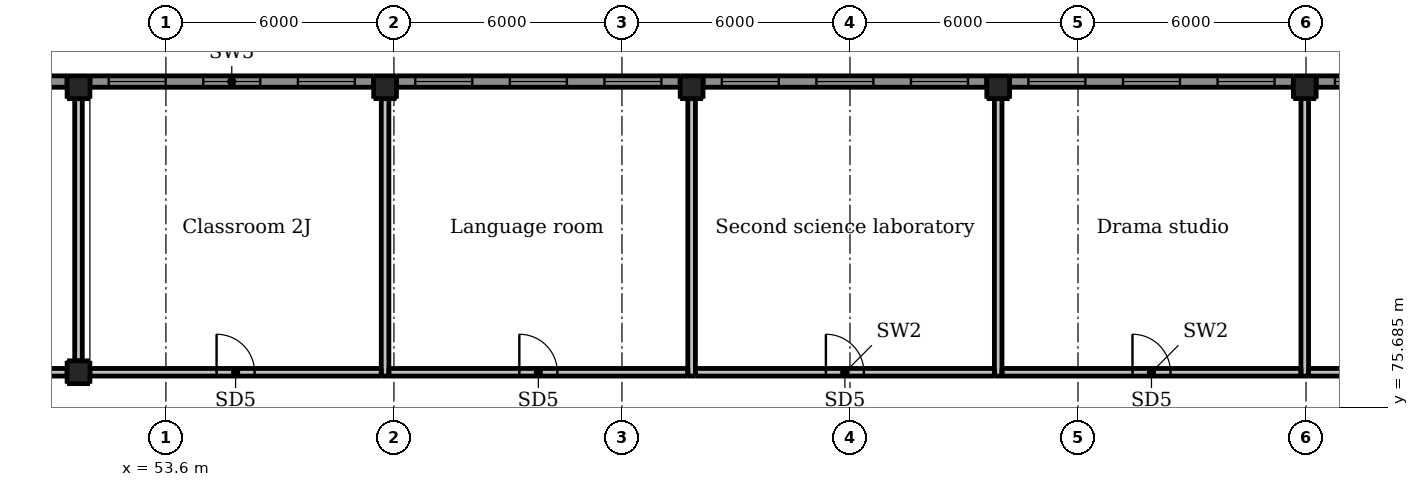
"""IFC4 building model, lengths in metres.
Left out: names, types, materials, properties, quantities, classifications, styles, units other than length and angle.
Written with IfcOpenShell. Run it as: python <this file> out.ifc"""

import sys

from ifc_helpers import new_model, si_unit, direction, frame, frame_2d, origin, origin_2d, place, context, subcontext, project, spatial, rectangle, extrude, element, fill, save


model = new_model("IFC4")
c1 = context("Model", 3, precision=1e-05, world=origin(), true_north=direction((0.0, 1.0)))
c2 = subcontext(c1, "Body", "Model", "MODEL_VIEW")
j1 = project(units=[si_unit("LENGTHUNIT", "METRE"), si_unit("PLANEANGLEUNIT", "RADIAN")], contexts=[c1])
p1 = place(None, origin())
s1 = spatial("IfcSite", under=j1, at=p1, CompositionType="ELEMENT")
p2 = place(p1, origin())
s2 = spatial("IfcBuilding", under=s1, at=p2, CompositionType="ELEMENT")
p3 = place(p2, frame((0.0, 0.0, 10.0)))
s3 = spatial("IfcBuildingStorey", under=s2, at=p3, CompositionType="ELEMENT", Elevation=10.0)
for number, where, z_axis, x_axis in (
    (1, (51.3, 76.6, -0.3), (0.0, 0.0, 1.0), (1.0, 0.0, 0.0)),
    (2, (51.3, 84.1, -0.3), (0.0, 0.0, 1.0), (1.0, 0.0, 0.0)),
    (3, (59.367, 84.1, -0.3), (0.0, 0.0, 1.0), (1.0, 0.0, 0.0)),
    (4, (67.433, 84.1, -0.3), (0.0, 0.0, 1.0), (1.0, 0.0, 0.0)),
    (5, (75.5, 84.1, -0.3), (0.0, 0.0, 1.0), (1.0, 0.0, 0.0)),
    (6, (83.567, 84.1, -0.3), (0.0, 0.0, 1.0), (1.0, 0.0, 0.0)),
):
    element("IfcColumn", number, at=place(p3, frame(where, z_axis=z_axis, x_axis=x_axis)), inside=s3, PredefinedType="COLUMN", context=c2, shape_type="SweptSolid", body=[
        extrude(rectangle(XDim=0.6, YDim=0.6, at=origin_2d()), origin(), (0.0, 0.0, 1.0), 4.5),
    ])
p4 = place(p3, frame((43.9, 84.25, 0.0), z_axis=(0.0, 0.0, 1.0), x_axis=(1.0, 0.0, 0.0)))
e7 = element("IfcWall", 7, at=p4, inside=s3, PredefinedType="SOLIDWALL", context=c2, shape_type="SweptSolid", body=[
    extrude(rectangle(XDim=7.1, YDim=0.3, at=frame_2d((3.55, 0.0))), origin(), (0.0, 0.0, 1.0), 3.3),
])
p5 = place(p4, frame((0.433, 0.0, 0.9)))
e8 = element("IfcOpeningElement", 8, at=p5, cuts=e7, PredefinedType="OPENING", context=c2, shape_type="SweptSolid", body=[
    extrude(rectangle(XDim=1.5, YDim=1.5, at=frame_2d((0.75, 0.75))), frame((0.0, 0.16, 0.0), z_axis=(0.0, -1.0, 0.0), x_axis=(1.0, 0.0, 0.0)), (0.0, 0.0, 1.0), 0.32),
])
p6 = place(p4, frame((2.8, 0.0, 0.9)))
e9 = element("IfcOpeningElement", 9, at=p6, cuts=e7, PredefinedType="OPENING", context=c2, shape_type="SweptSolid", body=[
    extrude(rectangle(XDim=1.5, YDim=1.5, at=frame_2d((0.75, 0.75))), frame((0.0, 0.16, 0.0), z_axis=(0.0, -1.0, 0.0), x_axis=(1.0, 0.0, 0.0)), (0.0, 0.0, 1.0), 0.32),
])
p7 = place(p4, frame((5.167, 0.0, 0.9)))
e10 = element("IfcOpeningElement", 10, at=p7, cuts=e7, PredefinedType="OPENING", context=c2, shape_type="SweptSolid", body=[
    extrude(rectangle(XDim=1.5, YDim=1.5, at=frame_2d((0.75, 0.75))), frame((0.0, 0.16, 0.0), z_axis=(0.0, -1.0, 0.0), x_axis=(1.0, 0.0, 0.0)), (0.0, 0.0, 1.0), 0.32),
])
p8 = place(p3, frame((51.6, 84.25, 0.0), z_axis=(0.0, 0.0, 1.0), x_axis=(1.0, 0.0, 0.0)))
e11 = element("IfcWall", 11, at=p8, inside=s3, PredefinedType="SOLIDWALL", context=c2, shape_type="SweptSolid", body=[
    extrude(rectangle(XDim=7.467, YDim=0.3, at=frame_2d((3.733, 0.0))), origin(), (0.0, 0.0, 1.0), 3.3),
])
p9 = place(p8, frame((0.494, 0.0, 0.9)))
e12 = element("IfcOpeningElement", 12, at=p9, cuts=e11, PredefinedType="OPENING", context=c2, shape_type="SweptSolid", body=[
    extrude(rectangle(XDim=1.5, YDim=1.5, at=frame_2d((0.75, 0.75))), frame((0.0, 0.16, 0.0), z_axis=(0.0, -1.0, 0.0), x_axis=(1.0, 0.0, 0.0)), (0.0, 0.0, 1.0), 0.32),
])
p10 = place(p8, frame((2.983, 0.0, 0.9)))
e13 = element("IfcOpeningElement", 13, at=p10, cuts=e11, PredefinedType="OPENING", context=c2, shape_type="SweptSolid", body=[
    extrude(rectangle(XDim=1.5, YDim=1.5, at=frame_2d((0.75, 0.75))), frame((0.0, 0.16, 0.0), z_axis=(0.0, -1.0, 0.0), x_axis=(1.0, 0.0, 0.0)), (0.0, 0.0, 1.0), 0.32),
])
p11 = place(p8, frame((5.472, 0.0, 0.9)))
e14 = element("IfcOpeningElement", 14, at=p11, cuts=e11, PredefinedType="OPENING", context=c2, shape_type="SweptSolid", body=[
    extrude(rectangle(XDim=1.5, YDim=1.5, at=frame_2d((0.75, 0.75))), frame((0.0, 0.16, 0.0), z_axis=(0.0, -1.0, 0.0), x_axis=(1.0, 0.0, 0.0)), (0.0, 0.0, 1.0), 0.32),
])
p12 = place(p3, frame((59.667, 84.25, 0.0), z_axis=(0.0, 0.0, 1.0), x_axis=(1.0, 0.0, 0.0)))
e15 = element("IfcWall", 15, at=p12, inside=s3, PredefinedType="SOLIDWALL", context=c2, shape_type="SweptSolid", body=[
    extrude(rectangle(XDim=7.466, YDim=0.3, at=frame_2d((3.733, 0.0))), origin(), (0.0, 0.0, 1.0), 3.3),
])
p13 = place(p12, frame((0.494, 0.0, 0.9)))
e16 = element("IfcOpeningElement", 16, at=p13, cuts=e15, PredefinedType="OPENING", context=c2, shape_type="SweptSolid", body=[
    extrude(rectangle(XDim=1.5, YDim=1.5, at=frame_2d((0.75, 0.75))), frame((0.0, 0.16, 0.0), z_axis=(0.0, -1.0, 0.0), x_axis=(1.0, 0.0, 0.0)), (0.0, 0.0, 1.0), 0.32),
])
p14 = place(p12, frame((2.983, 0.0, 0.9)))
e17 = element("IfcOpeningElement", 17, at=p14, cuts=e15, PredefinedType="OPENING", context=c2, shape_type="SweptSolid", body=[
    extrude(rectangle(XDim=1.5, YDim=1.5, at=frame_2d((0.75, 0.75))), frame((0.0, 0.16, 0.0), z_axis=(0.0, -1.0, 0.0), x_axis=(1.0, 0.0, 0.0)), (0.0, 0.0, 1.0), 0.32),
])
p15 = place(p12, frame((5.472, 0.0, 0.9)))
e18 = element("IfcOpeningElement", 18, at=p15, cuts=e15, PredefinedType="OPENING", context=c2, shape_type="SweptSolid", body=[
    extrude(rectangle(XDim=1.5, YDim=1.5, at=frame_2d((0.75, 0.75))), frame((0.0, 0.16, 0.0), z_axis=(0.0, -1.0, 0.0), x_axis=(1.0, 0.0, 0.0)), (0.0, 0.0, 1.0), 0.32),
])
p16 = place(p3, frame((67.733, 84.25, 0.0), z_axis=(0.0, 0.0, 1.0), x_axis=(1.0, 0.0, 0.0)))
e19 = element("IfcWall", 19, at=p16, inside=s3, PredefinedType="SOLIDWALL", context=c2, shape_type="SweptSolid", body=[
    extrude(rectangle(XDim=7.467, YDim=0.3, at=frame_2d((3.733, 0.0))), origin(), (0.0, 0.0, 1.0), 3.3),
])
p17 = place(p16, frame((0.494, 0.0, 0.9)))
e20 = element("IfcOpeningElement", 20, at=p17, cuts=e19, PredefinedType="OPENING", context=c2, shape_type="SweptSolid", body=[
    extrude(rectangle(XDim=1.5, YDim=1.5, at=frame_2d((0.75, 0.75))), frame((0.0, 0.16, 0.0), z_axis=(0.0, -1.0, 0.0), x_axis=(1.0, 0.0, 0.0)), (0.0, 0.0, 1.0), 0.32),
])
p18 = place(p16, frame((2.983, 0.0, 0.9)))
e21 = element("IfcOpeningElement", 21, at=p18, cuts=e19, PredefinedType="OPENING", context=c2, shape_type="SweptSolid", body=[
    extrude(rectangle(XDim=1.5, YDim=1.5, at=frame_2d((0.75, 0.75))), frame((0.0, 0.16, 0.0), z_axis=(0.0, -1.0, 0.0), x_axis=(1.0, 0.0, 0.0)), (0.0, 0.0, 1.0), 0.32),
])
p19 = place(p16, frame((5.472, 0.0, 0.9)))
e22 = element("IfcOpeningElement", 22, at=p19, cuts=e19, PredefinedType="OPENING", context=c2, shape_type="SweptSolid", body=[
    extrude(rectangle(XDim=1.5, YDim=1.5, at=frame_2d((0.75, 0.75))), frame((0.0, 0.16, 0.0), z_axis=(0.0, -1.0, 0.0), x_axis=(1.0, 0.0, 0.0)), (0.0, 0.0, 1.0), 0.32),
])
p20 = place(p3, frame((75.8, 84.25, 0.0), z_axis=(0.0, 0.0, 1.0), x_axis=(1.0, 0.0, 0.0)))
e23 = element("IfcWall", 23, at=p20, inside=s3, PredefinedType="SOLIDWALL", context=c2, shape_type="SweptSolid", body=[
    extrude(rectangle(XDim=7.467, YDim=0.3, at=frame_2d((3.733, 0.0))), origin(), (0.0, 0.0, 1.0), 3.3),
])
p21 = place(p20, frame((0.494, 0.0, 0.9)))
e24 = element("IfcOpeningElement", 24, at=p21, cuts=e23, PredefinedType="OPENING", context=c2, shape_type="SweptSolid", body=[
    extrude(rectangle(XDim=1.5, YDim=1.5, at=frame_2d((0.75, 0.75))), frame((0.0, 0.16, 0.0), z_axis=(0.0, -1.0, 0.0), x_axis=(1.0, 0.0, 0.0)), (0.0, 0.0, 1.0), 0.32),
])
p22 = place(p20, frame((2.983, 0.0, 0.9)))
e25 = element("IfcOpeningElement", 25, at=p22, cuts=e23, PredefinedType="OPENING", context=c2, shape_type="SweptSolid", body=[
    extrude(rectangle(XDim=1.5, YDim=1.5, at=frame_2d((0.75, 0.75))), frame((0.0, 0.16, 0.0), z_axis=(0.0, -1.0, 0.0), x_axis=(1.0, 0.0, 0.0)), (0.0, 0.0, 1.0), 0.32),
])
p23 = place(p20, frame((5.472, 0.0, 0.9)))
e26 = element("IfcOpeningElement", 26, at=p23, cuts=e23, PredefinedType="OPENING", context=c2, shape_type="SweptSolid", body=[
    extrude(rectangle(XDim=1.5, YDim=1.5, at=frame_2d((0.75, 0.75))), frame((0.0, 0.16, 0.0), z_axis=(0.0, -1.0, 0.0), x_axis=(1.0, 0.0, 0.0)), (0.0, 0.0, 1.0), 0.32),
])
p24 = place(p3, frame((83.867, 84.25, 0.0), z_axis=(0.0, 0.0, 1.0), x_axis=(1.0, 0.0, 0.0)))
e27 = element("IfcWall", 27, at=p24, inside=s3, PredefinedType="SOLIDWALL", context=c2, shape_type="SweptSolid", body=[
    extrude(rectangle(XDim=7.466, YDim=0.3, at=frame_2d((3.733, 0.0))), origin(), (0.0, 0.0, 1.0), 3.3),
])
p25 = place(p24, frame((0.494, 0.0, 0.9)))
e28 = element("IfcOpeningElement", 28, at=p25, cuts=e27, PredefinedType="OPENING", context=c2, shape_type="SweptSolid", body=[
    extrude(rectangle(XDim=1.5, YDim=1.5, at=frame_2d((0.75, 0.75))), frame((0.0, 0.16, 0.0), z_axis=(0.0, -1.0, 0.0), x_axis=(1.0, 0.0, 0.0)), (0.0, 0.0, 1.0), 0.32),
])
p26 = place(p24, frame((2.983, 0.0, 0.9)))
e29 = element("IfcOpeningElement", 29, at=p26, cuts=e27, PredefinedType="OPENING", context=c2, shape_type="SweptSolid", body=[
    extrude(rectangle(XDim=1.5, YDim=1.5, at=frame_2d((0.75, 0.75))), frame((0.0, 0.16, 0.0), z_axis=(0.0, -1.0, 0.0), x_axis=(1.0, 0.0, 0.0)), (0.0, 0.0, 1.0), 0.32),
])
p27 = place(p24, frame((5.472, 0.0, 0.9)))
e30 = element("IfcOpeningElement", 30, at=p27, cuts=e27, PredefinedType="OPENING", context=c2, shape_type="SweptSolid", body=[
    extrude(rectangle(XDim=1.5, YDim=1.5, at=frame_2d((0.75, 0.75))), frame((0.0, 0.16, 0.0), z_axis=(0.0, -1.0, 0.0), x_axis=(1.0, 0.0, 0.0)), (0.0, 0.0, 1.0), 0.32),
])
p28 = place(p3, frame((36.2, 76.6, 0.0), z_axis=(0.0, 0.0, 1.0), x_axis=(1.0, 0.0, 0.0)))
e31 = element("IfcWall", 31, at=p28, inside=s3, PredefinedType="PARTITIONING", context=c2, shape_type="SweptSolid", body=[
    extrude(rectangle(XDim=14.8, YDim=0.2, at=frame_2d((7.4, 0.0))), origin(), (0.0, 0.0, 1.0), 3.1),
])
p29 = place(p28, frame((11.1, 0.0, 0.0)))
e32 = element("IfcOpeningElement", 32, at=p29, cuts=e31, PredefinedType="OPENING", context=c2, shape_type="SweptSolid", body=[
    extrude(rectangle(XDim=1.0, YDim=2.1, at=frame_2d((0.5, 1.05))), frame((0.0, 0.11, 0.0), z_axis=(0.0, -1.0, 0.0), x_axis=(1.0, 0.0, 0.0)), (0.0, 0.0, 1.0), 0.22),
])
p30 = place(p3, frame((51.3, 76.9, 0.0), z_axis=(0.0, 0.0, 1.0), x_axis=(0.0, 1.0, 0.0)))
e33 = element("IfcWall", 33, at=p30, inside=s3, PredefinedType="PARTITIONING", context=c2, shape_type="SweptSolid", body=[
    extrude(rectangle(XDim=6.9, YDim=0.2, at=frame_2d((3.45, 0.0))), origin(), (0.0, 0.0, 1.0), 3.1),
])
p31 = place(p3, frame((51.6, 76.6, 0.0), z_axis=(0.0, 0.0, 1.0), x_axis=(1.0, 0.0, 0.0)))
e34 = element("IfcWall", 34, at=p31, inside=s3, PredefinedType="PARTITIONING", context=c2, shape_type="SweptSolid", body=[
    extrude(rectangle(XDim=7.667, YDim=0.2, at=frame_2d((3.833, 0.0))), origin(), (0.0, 0.0, 1.0), 3.1),
])
p32 = place(p31, frame((3.333, 0.0, 0.0)))
e35 = element("IfcOpeningElement", 35, at=p32, cuts=e34, PredefinedType="OPENING", context=c2, shape_type="SweptSolid", body=[
    extrude(rectangle(XDim=1.0, YDim=2.1, at=frame_2d((0.5, 1.05))), frame((0.0, 0.11, 0.0), z_axis=(0.0, -1.0, 0.0), x_axis=(1.0, 0.0, 0.0)), (0.0, 0.0, 1.0), 0.22),
])
p33 = place(p3, frame((59.467, 76.6, 0.0), z_axis=(0.0, 0.0, 1.0), x_axis=(1.0, 0.0, 0.0)))
e36 = element("IfcWall", 36, at=p33, inside=s3, PredefinedType="PARTITIONING", context=c2, shape_type="SweptSolid", body=[
    extrude(rectangle(XDim=7.866, YDim=0.2, at=frame_2d((3.933, 0.0))), origin(), (0.0, 0.0, 1.0), 3.1),
])
p34 = place(p33, frame((3.433, 0.0, 0.0)))
e37 = element("IfcOpeningElement", 37, at=p34, cuts=e36, PredefinedType="OPENING", context=c2, shape_type="SweptSolid", body=[
    extrude(rectangle(XDim=1.0, YDim=2.1, at=frame_2d((0.5, 1.05))), frame((0.0, 0.11, 0.0), z_axis=(0.0, -1.0, 0.0), x_axis=(1.0, 0.0, 0.0)), (0.0, 0.0, 1.0), 0.22),
])
p35 = place(p3, frame((67.533, 76.6, 0.0), z_axis=(0.0, 0.0, 1.0), x_axis=(1.0, 0.0, 0.0)))
e38 = element("IfcWall", 38, at=p35, inside=s3, PredefinedType="PARTITIONING", context=c2, shape_type="SweptSolid", body=[
    extrude(rectangle(XDim=7.867, YDim=0.2, at=frame_2d((3.934, 0.0))), origin(), (0.0, 0.0, 1.0), 3.1),
])
p36 = place(p35, frame((3.434, 0.0, 0.0)))
e39 = element("IfcOpeningElement", 39, at=p36, cuts=e38, PredefinedType="OPENING", context=c2, shape_type="SweptSolid", body=[
    extrude(rectangle(XDim=1.0, YDim=2.1, at=frame_2d((0.5, 1.05))), frame((0.0, 0.11, 0.0), z_axis=(0.0, -1.0, 0.0), x_axis=(1.0, 0.0, 0.0)), (0.0, 0.0, 1.0), 0.22),
])
p37 = place(p3, frame((75.6, 76.6, 0.0), z_axis=(0.0, 0.0, 1.0), x_axis=(1.0, 0.0, 0.0)))
e40 = element("IfcWall", 40, at=p37, inside=s3, PredefinedType="PARTITIONING", context=c2, shape_type="SweptSolid", body=[
    extrude(rectangle(XDim=7.867, YDim=0.2, at=frame_2d((3.934, 0.0))), origin(), (0.0, 0.0, 1.0), 3.1),
])
p38 = place(p37, frame((3.434, 0.0, 0.0)))
e41 = element("IfcOpeningElement", 41, at=p38, cuts=e40, PredefinedType="OPENING", context=c2, shape_type="SweptSolid", body=[
    extrude(rectangle(XDim=1.0, YDim=2.1, at=frame_2d((0.5, 1.05))), frame((0.0, 0.11, 0.0), z_axis=(0.0, -1.0, 0.0), x_axis=(1.0, 0.0, 0.0)), (0.0, 0.0, 1.0), 0.22),
])
p39 = place(p3, frame((83.667, 76.6, 0.0), z_axis=(0.0, 0.0, 1.0), x_axis=(1.0, 0.0, 0.0)))
e42 = element("IfcWall", 42, at=p39, inside=s3, PredefinedType="PARTITIONING", context=c2, shape_type="SweptSolid", body=[
    extrude(rectangle(XDim=7.866, YDim=0.2, at=frame_2d((3.933, 0.0))), origin(), (0.0, 0.0, 1.0), 3.1),
])
p40 = place(p39, frame((3.433, 0.0, 0.0)))
e43 = element("IfcOpeningElement", 43, at=p40, cuts=e42, PredefinedType="OPENING", context=c2, shape_type="SweptSolid", body=[
    extrude(rectangle(XDim=1.0, YDim=2.1, at=frame_2d((0.5, 1.05))), frame((0.0, 0.11, 0.0), z_axis=(0.0, -1.0, 0.0), x_axis=(1.0, 0.0, 0.0)), (0.0, 0.0, 1.0), 0.22),
])
for number, where, z_axis, x_axis in (
    (44, (59.367, 76.5, 0.0), (0.0, 0.0, 1.0), (0.0, 1.0, 0.0)),
    (45, (67.433, 76.5, 0.0), (0.0, 0.0, 1.0), (0.0, 1.0, 0.0)),
    (46, (75.5, 76.5, 0.0), (0.0, 0.0, 1.0), (0.0, 1.0, 0.0)),
    (47, (83.567, 76.5, 0.0), (0.0, 0.0, 1.0), (0.0, 1.0, 0.0)),
):
    element("IfcWall", number, at=place(p3, frame(where, z_axis=z_axis, x_axis=x_axis)), inside=s3, PredefinedType="PARTITIONING", context=c2, shape_type="SweptSolid", body=[
        extrude(rectangle(XDim=7.3, YDim=0.2, at=frame_2d((3.65, 0.0))), origin(), (0.0, 0.0, 1.0), 3.1),
    ])
p41 = place(p9, origin())
e48 = element("IfcWindow", 48, at=p41, inside=s3, PartitioningType="DOUBLE_PANEL_HORIZONTAL", PredefinedType="WINDOW", context=c2, shape_type="SweptSolid", body=[
    extrude(rectangle(XDim=1.5, YDim=1.5, at=frame_2d((0.75, 0.75))), frame((0.0, 0.03, 0.0), z_axis=(0.0, -1.0, 0.0), x_axis=(1.0, 0.0, 0.0)), (0.0, 0.0, 1.0), 0.06),
])
fill(e12, e48)
p42 = place(p10, origin())
e49 = element("IfcWindow", 49, at=p42, inside=s3, PartitioningType="DOUBLE_PANEL_HORIZONTAL", PredefinedType="WINDOW", context=c2, shape_type="SweptSolid", body=[
    extrude(rectangle(XDim=1.5, YDim=1.5, at=frame_2d((0.75, 0.75))), frame((0.0, 0.03, 0.0), z_axis=(0.0, -1.0, 0.0), x_axis=(1.0, 0.0, 0.0)), (0.0, 0.0, 1.0), 0.06),
])
fill(e13, e49)
p43 = place(p11, origin())
e50 = element("IfcWindow", 50, at=p43, inside=s3, PartitioningType="DOUBLE_PANEL_HORIZONTAL", PredefinedType="WINDOW", context=c2, shape_type="SweptSolid", body=[
    extrude(rectangle(XDim=1.5, YDim=1.5, at=frame_2d((0.75, 0.75))), frame((0.0, 0.03, 0.0), z_axis=(0.0, -1.0, 0.0), x_axis=(1.0, 0.0, 0.0)), (0.0, 0.0, 1.0), 0.06),
])
fill(e14, e50)
p44 = place(p13, origin())
e51 = element("IfcWindow", 51, at=p44, inside=s3, PartitioningType="DOUBLE_PANEL_HORIZONTAL", PredefinedType="WINDOW", context=c2, shape_type="SweptSolid", body=[
    extrude(rectangle(XDim=1.5, YDim=1.5, at=frame_2d((0.75, 0.75))), frame((0.0, 0.03, 0.0), z_axis=(0.0, -1.0, 0.0), x_axis=(1.0, 0.0, 0.0)), (0.0, 0.0, 1.0), 0.06),
])
fill(e16, e51)
p45 = place(p14, origin())
e52 = element("IfcWindow", 52, at=p45, inside=s3, PartitioningType="DOUBLE_PANEL_HORIZONTAL", PredefinedType="WINDOW", context=c2, shape_type="SweptSolid", body=[
    extrude(rectangle(XDim=1.5, YDim=1.5, at=frame_2d((0.75, 0.75))), frame((0.0, 0.03, 0.0), z_axis=(0.0, -1.0, 0.0), x_axis=(1.0, 0.0, 0.0)), (0.0, 0.0, 1.0), 0.06),
])
fill(e17, e52)
p46 = place(p15, origin())
e53 = element("IfcWindow", 53, at=p46, inside=s3, PartitioningType="DOUBLE_PANEL_HORIZONTAL", PredefinedType="WINDOW", context=c2, shape_type="SweptSolid", body=[
    extrude(rectangle(XDim=1.5, YDim=1.5, at=frame_2d((0.75, 0.75))), frame((0.0, 0.03, 0.0), z_axis=(0.0, -1.0, 0.0), x_axis=(1.0, 0.0, 0.0)), (0.0, 0.0, 1.0), 0.06),
])
fill(e18, e53)
p47 = place(p17, origin())
e54 = element("IfcWindow", 54, at=p47, inside=s3, PartitioningType="DOUBLE_PANEL_HORIZONTAL", PredefinedType="WINDOW", context=c2, shape_type="SweptSolid", body=[
    extrude(rectangle(XDim=1.5, YDim=1.5, at=frame_2d((0.75, 0.75))), frame((0.0, 0.03, 0.0), z_axis=(0.0, -1.0, 0.0), x_axis=(1.0, 0.0, 0.0)), (0.0, 0.0, 1.0), 0.06),
])
fill(e20, e54)
p48 = place(p18, origin())
e55 = element("IfcWindow", 55, at=p48, inside=s3, PartitioningType="DOUBLE_PANEL_HORIZONTAL", PredefinedType="WINDOW", context=c2, shape_type="SweptSolid", body=[
    extrude(rectangle(XDim=1.5, YDim=1.5, at=frame_2d((0.75, 0.75))), frame((0.0, 0.03, 0.0), z_axis=(0.0, -1.0, 0.0), x_axis=(1.0, 0.0, 0.0)), (0.0, 0.0, 1.0), 0.06),
])
fill(e21, e55)
p49 = place(p19, origin())
e56 = element("IfcWindow", 56, at=p49, inside=s3, PartitioningType="DOUBLE_PANEL_HORIZONTAL", PredefinedType="WINDOW", context=c2, shape_type="SweptSolid", body=[
    extrude(rectangle(XDim=1.5, YDim=1.5, at=frame_2d((0.75, 0.75))), frame((0.0, 0.03, 0.0), z_axis=(0.0, -1.0, 0.0), x_axis=(1.0, 0.0, 0.0)), (0.0, 0.0, 1.0), 0.06),
])
fill(e22, e56)
p50 = place(p21, origin())
e57 = element("IfcWindow", 57, at=p50, inside=s3, PartitioningType="DOUBLE_PANEL_HORIZONTAL", PredefinedType="WINDOW", context=c2, shape_type="SweptSolid", body=[
    extrude(rectangle(XDim=1.5, YDim=1.5, at=frame_2d((0.75, 0.75))), frame((0.0, 0.03, 0.0), z_axis=(0.0, -1.0, 0.0), x_axis=(1.0, 0.0, 0.0)), (0.0, 0.0, 1.0), 0.06),
])
fill(e24, e57)
p51 = place(p22, origin())
e58 = element("IfcWindow", 58, at=p51, inside=s3, PartitioningType="DOUBLE_PANEL_HORIZONTAL", PredefinedType="WINDOW", context=c2, shape_type="SweptSolid", body=[
    extrude(rectangle(XDim=1.5, YDim=1.5, at=frame_2d((0.75, 0.75))), frame((0.0, 0.03, 0.0), z_axis=(0.0, -1.0, 0.0), x_axis=(1.0, 0.0, 0.0)), (0.0, 0.0, 1.0), 0.06),
])
fill(e25, e58)
p52 = place(p23, origin())
e59 = element("IfcWindow", 59, at=p52, inside=s3, PartitioningType="DOUBLE_PANEL_HORIZONTAL", PredefinedType="WINDOW", context=c2, shape_type="SweptSolid", body=[
    extrude(rectangle(XDim=1.5, YDim=1.5, at=frame_2d((0.75, 0.75))), frame((0.0, 0.03, 0.0), z_axis=(0.0, -1.0, 0.0), x_axis=(1.0, 0.0, 0.0)), (0.0, 0.0, 1.0), 0.06),
])
fill(e26, e59)
p53 = place(p25, origin())
e60 = element("IfcWindow", 60, at=p53, inside=s3, PartitioningType="DOUBLE_PANEL_HORIZONTAL", PredefinedType="WINDOW", context=c2, shape_type="SweptSolid", body=[
    extrude(rectangle(XDim=1.5, YDim=1.5, at=frame_2d((0.75, 0.75))), frame((0.0, 0.03, 0.0), z_axis=(0.0, -1.0, 0.0), x_axis=(1.0, 0.0, 0.0)), (0.0, 0.0, 1.0), 0.06),
])
fill(e28, e60)
p54 = place(p32, origin())
e61 = element("IfcDoor", 61, at=p54, inside=s3, OperationType="SINGLE_SWING_LEFT", PredefinedType="DOOR", context=c2, shape_type="SweptSolid", body=[
    extrude(rectangle(XDim=1.0, YDim=2.1, at=frame_2d((0.5, 1.05))), frame((0.0, 0.025, 0.0), z_axis=(0.0, -1.0, 0.0), x_axis=(1.0, 0.0, 0.0)), (0.0, 0.0, 1.0), 0.05),
])
fill(e35, e61)
p55 = place(p34, origin())
e62 = element("IfcDoor", 62, at=p55, inside=s3, OperationType="SINGLE_SWING_LEFT", PredefinedType="DOOR", context=c2, shape_type="SweptSolid", body=[
    extrude(rectangle(XDim=1.0, YDim=2.1, at=frame_2d((0.5, 1.05))), frame((0.0, 0.025, 0.0), z_axis=(0.0, -1.0, 0.0), x_axis=(1.0, 0.0, 0.0)), (0.0, 0.0, 1.0), 0.05),
])
fill(e37, e62)
p56 = place(p36, origin())
e63 = element("IfcDoor", 63, at=p56, inside=s3, OperationType="SINGLE_SWING_LEFT", PredefinedType="DOOR", context=c2, shape_type="SweptSolid", body=[
    extrude(rectangle(XDim=1.0, YDim=2.1, at=frame_2d((0.5, 1.05))), frame((0.0, 0.025, 0.0), z_axis=(0.0, -1.0, 0.0), x_axis=(1.0, 0.0, 0.0)), (0.0, 0.0, 1.0), 0.05),
])
fill(e39, e63)
p57 = place(p38, origin())
e64 = element("IfcDoor", 64, at=p57, inside=s3, OperationType="SINGLE_SWING_LEFT", PredefinedType="DOOR", context=c2, shape_type="SweptSolid", body=[
    extrude(rectangle(XDim=1.0, YDim=2.1, at=frame_2d((0.5, 1.05))), frame((0.0, 0.025, 0.0), z_axis=(0.0, -1.0, 0.0), x_axis=(1.0, 0.0, 0.0)), (0.0, 0.0, 1.0), 0.05),
])
fill(e41, e64)
save(model, sys.argv[1])
